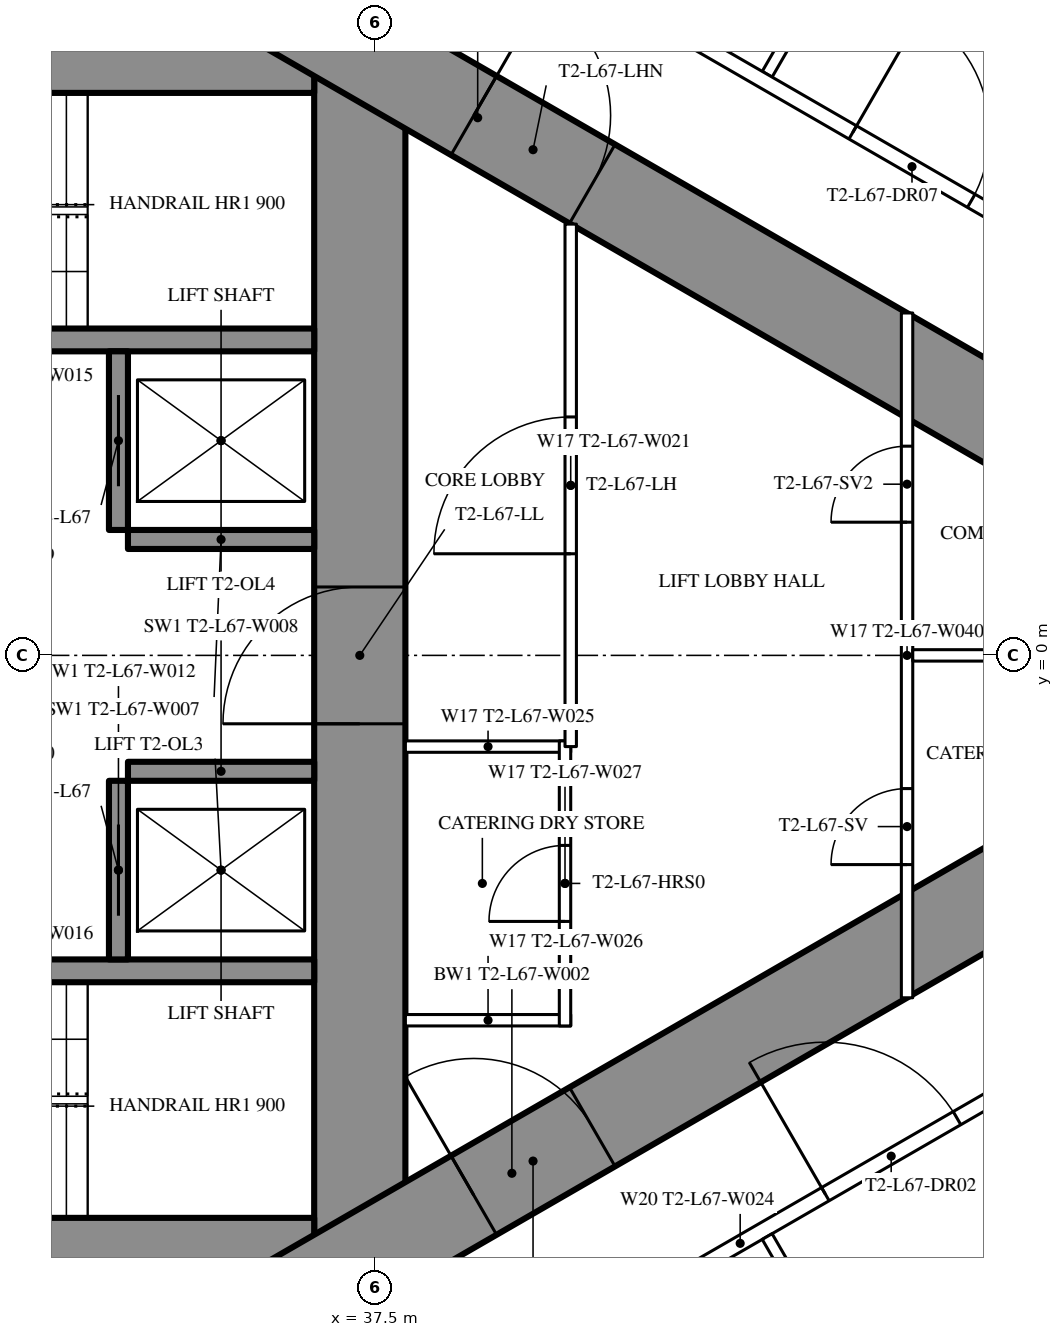
"""IFC4 building model, lengths in metres.
Left out: names, types, materials, properties, quantities, classifications, styles, units other than length and angle.
Written with IfcOpenShell. Run it as: python <this file> out.ifc"""

import sys

from ifc_helpers import new_model, si_unit, direction, frame, frame_2d, origin, place, context, subcontext, project, spatial, rectangle, extrude, element, fill, save


model = new_model("IFC4")
c1 = context("Model", 3, precision=1e-05, world=origin(), true_north=direction((0.0, 1.0)))
c2 = subcontext(c1, "Body", "Model", "MODEL_VIEW")
j1 = project(units=[si_unit("LENGTHUNIT", "METRE"), si_unit("PLANEANGLEUNIT", "RADIAN")], contexts=[c1])
p1 = place(None, origin())
s1 = spatial("IfcSite", under=j1, at=p1, CompositionType="ELEMENT")
p2 = place(p1, origin())
s2 = spatial("IfcBuilding", under=s1, at=p2, CompositionType="ELEMENT")
p3 = place(p2, frame((0.0, 0.0, 251.9)))
s3 = spatial("IfcBuildingStorey", under=s2, at=p3, CompositionType="ELEMENT", Elevation=251.9)
p4 = place(p3, frame((37.3, -8.6, 0.0), z_axis=(0.0, 0.0, 1.0), x_axis=(0.0, 1.0, 0.0)))
e1 = element("IfcWall", 1, at=p4, inside=s3, PredefinedType="SHEAR", context=c2, shape_type="SweptSolid", body=[
    extrude(rectangle(XDim=17.2, YDim=1.2, at=frame_2d((8.6, 0.0))), origin(), (0.0, 0.0, 1.0), 5.4),
])
p5 = place(p4, frame((7.7, 0.0, 0.0)))
e2 = element("IfcOpeningElement", 2, at=p5, cuts=e1, PredefinedType="OPENING", context=c2, shape_type="SweptSolid", body=[
    extrude(rectangle(XDim=1.8, YDim=2.2, at=frame_2d((0.9, 1.1))), frame((0.0, 0.61, 0.0), z_axis=(0.0, -1.0, 0.0), x_axis=(1.0, 0.0, 0.0)), (0.0, 0.0, 1.0), 1.22),
])
p6 = place(p3, frame((28.3, -8.0, 0.0), z_axis=(0.0, 0.0, 1.0), x_axis=(1.0, 0.0, 0.0)))
e3 = element("IfcWall", 3, at=p6, inside=s3, PredefinedType="SHEAR", context=c2, shape_type="SweptSolid", body=[
    extrude(rectangle(XDim=8.4, YDim=1.2, at=frame_2d((4.2, 0.0))), origin(), (0.0, 0.0, 1.0), 5.4),
])
p7 = place(p6, frame((0.25, 0.0, 0.0)))
e4 = element("IfcOpeningElement", 4, at=p7, cuts=e3, PredefinedType="OPENING", context=c2, shape_type="SweptSolid", body=[
    extrude(rectangle(XDim=1.0, YDim=2.2, at=frame_2d((0.5, 1.1))), frame((0.0, 0.61, 0.0), z_axis=(0.0, -1.0, 0.0), x_axis=(1.0, 0.0, 0.0)), (0.0, 0.0, 1.0), 1.22),
])
p8 = place(p3, frame((28.3, 8.0, 0.0), z_axis=(0.0, 0.0, 1.0), x_axis=(1.0, 0.0, 0.0)))
e5 = element("IfcWall", 5, at=p8, inside=s3, PredefinedType="SHEAR", context=c2, shape_type="SweptSolid", body=[
    extrude(rectangle(XDim=8.4, YDim=1.2, at=frame_2d((4.2, 0.0))), origin(), (0.0, 0.0, 1.0), 5.4),
])
p9 = place(p8, frame((0.25, 0.0, 0.0)))
e6 = element("IfcOpeningElement", 6, at=p9, cuts=e5, PredefinedType="OPENING", context=c2, shape_type="SweptSolid", body=[
    extrude(rectangle(XDim=1.0, YDim=2.2, at=frame_2d((0.5, 1.1))), frame((0.0, 0.61, 0.0), z_axis=(0.0, -1.0, 0.0), x_axis=(1.0, 0.0, 0.0)), (0.0, 0.0, 1.0), 1.22),
])
for number, where, z_axis, x_axis in (
    (7, (28.3, -4.15, 0.0), (0.0, 0.0, 1.0), (1.0, 0.0, 0.0)),
    (8, (28.3, 4.15, 0.0), (0.0, 0.0, 1.0), (1.0, 0.0, 0.0)),
):
    element("IfcWall", number, at=place(p3, frame(where, z_axis=z_axis, x_axis=x_axis)), inside=s3, PredefinedType="SHEAR", context=c2, shape_type="SweptSolid", body=[
        extrude(rectangle(XDim=8.4, YDim=0.3, at=frame_2d((4.2, 0.0))), origin(), (0.0, 0.0, 1.0), 5.4),
    ])
p10 = place(p3, frame((34.125, -4.0, 0.0), z_axis=(0.0, 0.0, 1.0), x_axis=(0.0, 1.0, 0.0)))
e9 = element("IfcWall", 9, at=p10, inside=s3, PredefinedType="SHEAR", context=c2, shape_type="SweptSolid", body=[
    extrude(rectangle(XDim=2.35, YDim=0.25, at=frame_2d((1.175, 0.0))), origin(), (0.0, 0.0, 1.0), 5.4),
])
p11 = place(p10, frame((0.575, 0.0, 0.0)))
e10 = element("IfcOpeningElement", 10, at=p11, cuts=e9, PredefinedType="OPENING", context=c2, shape_type="SweptSolid", body=[
    extrude(rectangle(XDim=1.2, YDim=2.2, at=frame_2d((0.6, 1.1))), frame((0.0, 0.135, 0.0), z_axis=(0.0, -1.0, 0.0), x_axis=(1.0, 0.0, 0.0)), (0.0, 0.0, 1.0), 0.27),
])
p12 = place(p3, frame((34.25, -1.525, 0.0), z_axis=(0.0, 0.0, 1.0), x_axis=(1.0, 0.0, 0.0)))
e11 = element("IfcWall", 11, at=p12, inside=s3, PredefinedType="SHEAR", context=c2, shape_type="SweptSolid", body=[
    extrude(rectangle(XDim=2.45, YDim=0.25, at=frame_2d((1.225, 0.0))), origin(), (0.0, 0.0, 1.0), 5.4),
])
p13 = place(p3, frame((34.125, 1.65, 0.0), z_axis=(0.0, 0.0, 1.0), x_axis=(0.0, 1.0, 0.0)))
e12 = element("IfcWall", 12, at=p13, inside=s3, PredefinedType="SHEAR", context=c2, shape_type="SweptSolid", body=[
    extrude(rectangle(XDim=2.35, YDim=0.25, at=frame_2d((1.175, 0.0))), origin(), (0.0, 0.0, 1.0), 5.4),
])
p14 = place(p13, frame((0.575, 0.0, 0.0)))
e13 = element("IfcOpeningElement", 13, at=p14, cuts=e12, PredefinedType="OPENING", context=c2, shape_type="SweptSolid", body=[
    extrude(rectangle(XDim=1.2, YDim=2.2, at=frame_2d((0.6, 1.1))), frame((0.0, 0.135, 0.0), z_axis=(0.0, -1.0, 0.0), x_axis=(1.0, 0.0, 0.0)), (0.0, 0.0, 1.0), 0.27),
])
p15 = place(p3, frame((34.25, 1.525, 0.0), z_axis=(0.0, 0.0, 1.0), x_axis=(1.0, 0.0, 0.0)))
e14 = element("IfcWall", 14, at=p15, inside=s3, PredefinedType="SHEAR", context=c2, shape_type="SweptSolid", body=[
    extrude(rectangle(XDim=2.45, YDim=0.25, at=frame_2d((1.225, 0.0))), origin(), (0.0, 0.0, 1.0), 5.4),
])
p16 = place(p3, frame((27.2, -13.8, 0.0), z_axis=(0.0, 0.0, 1.0), x_axis=(0.866027159892, 0.499996958321, 0.0)))
e15 = element("IfcWall", 15, at=p16, inside=s3, PredefinedType="SHEAR", context=c2, shape_type="SweptSolid", body=[
    extrude(rectangle(XDim=27.947, YDim=1.2, at=frame_2d((13.973, 0.0))), origin(), (0.0, 0.0, 1.0), 5.4),
])
p17 = place(p16, frame((4.6, 0.0, 0.0)))
e16 = element("IfcOpeningElement", 16, at=p17, cuts=e15, PredefinedType="OPENING", context=c2, shape_type="SweptSolid", body=[
    extrude(rectangle(XDim=1.0, YDim=2.2, at=frame_2d((0.5, 1.1))), frame((0.0, 0.61, 0.0), z_axis=(0.0, -1.0, 0.0), x_axis=(1.0, 0.0, 0.0)), (0.0, 0.0, 1.0), 1.22),
])
p18 = place(p16, frame((13.395, 0.0, 0.0)))
e17 = element("IfcOpeningElement", 17, at=p18, cuts=e15, PredefinedType="OPENING", context=c2, shape_type="SweptSolid", body=[
    extrude(rectangle(XDim=1.8, YDim=2.2, at=frame_2d((0.9, 1.1))), frame((0.0, 0.61, 0.0), z_axis=(0.0, -1.0, 0.0), x_axis=(1.0, 0.0, 0.0)), (0.0, 0.0, 1.0), 1.22),
])
p19 = place(p3, frame((27.2, 13.8, 0.0), z_axis=(0.0, 0.0, 1.0), x_axis=(0.866024515034, -0.500001539357, 0.0)))
e18 = element("IfcWall", 18, at=p19, inside=s3, PredefinedType="SHEAR", context=c2, shape_type="SweptSolid", body=[
    extrude(rectangle(XDim=26.907, YDim=1.2, at=frame_2d((13.454, 0.0))), origin(), (0.0, 0.0, 1.0), 5.4),
])
p20 = place(p19, frame((4.6, 0.0, 0.0)))
e19 = element("IfcOpeningElement", 19, at=p20, cuts=e18, PredefinedType="OPENING", context=c2, shape_type="SweptSolid", body=[
    extrude(rectangle(XDim=1.0, YDim=2.2, at=frame_2d((0.5, 1.1))), frame((0.0, 0.61, 0.0), z_axis=(0.0, -1.0, 0.0), x_axis=(1.0, 0.0, 0.0)), (0.0, 0.0, 1.0), 1.22),
])
p21 = place(p19, frame((13.395, 0.0, 0.0)))
e20 = element("IfcOpeningElement", 20, at=p21, cuts=e18, PredefinedType="OPENING", context=c2, shape_type="SweptSolid", body=[
    extrude(rectangle(XDim=1.8, YDim=2.2, at=frame_2d((0.9, 1.1))), frame((0.0, 0.61, 0.0), z_axis=(0.0, -1.0, 0.0), x_axis=(1.0, 0.0, 0.0)), (0.0, 0.0, 1.0), 1.22),
])
p22 = place(p3, frame((28.907, -15.47, 0.0), z_axis=(0.0, 0.0, 1.0), x_axis=(0.866023700353, 0.500002950419, 0.0)))
e21 = element("IfcWall", 21, at=p22, inside=s3, PredefinedType="PARTITIONING", context=c2, shape_type="SweptSolid", body=[
    extrude(rectangle(XDim=30.941, YDim=0.2, at=frame_2d((15.47, 0.0))), origin(), (0.0, 0.0, 1.0), 5.15),
])
p23 = place(p22, frame((7.124, 0.0, 0.0)))
e22 = element("IfcOpeningElement", 22, at=p23, cuts=e21, PredefinedType="OPENING", context=c2, shape_type="SweptSolid", body=[
    extrude(rectangle(XDim=1.8, YDim=2.2, at=frame_2d((0.9, 1.1))), frame((0.0, 0.11, 0.0), z_axis=(0.0, -1.0, 0.0), x_axis=(1.0, 0.0, 0.0)), (0.0, 0.0, 1.0), 0.22),
])
p24 = place(p22, frame((16.765, 0.0, 0.0)))
e23 = element("IfcOpeningElement", 23, at=p24, cuts=e21, PredefinedType="OPENING", context=c2, shape_type="SweptSolid", body=[
    extrude(rectangle(XDim=2.0, YDim=2.4, at=frame_2d((1.0, 1.2))), frame((0.0, 0.11, 0.0), z_axis=(0.0, -1.0, 0.0), x_axis=(1.0, 0.0, 0.0)), (0.0, 0.0, 1.0), 0.22),
])
p25 = place(p22, frame((20.748, 0.0, 0.0)))
e24 = element("IfcOpeningElement", 24, at=p25, cuts=e21, PredefinedType="OPENING", context=c2, shape_type="SweptSolid", body=[
    extrude(rectangle(XDim=1.8, YDim=2.2, at=frame_2d((0.9, 1.1))), frame((0.0, 0.11, 0.0), z_axis=(0.0, -1.0, 0.0), x_axis=(1.0, 0.0, 0.0)), (0.0, 0.0, 1.0), 0.22),
])
p26 = place(p22, frame((26.252, 0.0, 0.0)))
e25 = element("IfcOpeningElement", 25, at=p26, cuts=e21, PredefinedType="OPENING", context=c2, shape_type="SweptSolid", body=[
    extrude(rectangle(XDim=1.8, YDim=2.2, at=frame_2d((0.9, 1.1))), frame((0.0, 0.11, 0.0), z_axis=(0.0, -1.0, 0.0), x_axis=(1.0, 0.0, 0.0)), (0.0, 0.0, 1.0), 0.22),
])
for number, where, z_axis, x_axis in (
    (26, (42.66, -7.646, 0.0), (0.0, 0.0, 1.0), (0.5, -0.866, 0.0)),
    (27, (42.66, 7.646, 0.0), (0.0, 0.0, 1.0), (0.5, 0.866, 0.0)),
):
    element("IfcWall", number, at=place(p3, frame(where, z_axis=z_axis, x_axis=x_axis)), inside=s3, PredefinedType="PARTITIONING", context=c2, shape_type="SweptSolid", body=[
        extrude(rectangle(XDim=6.398, YDim=0.15, at=frame_2d((3.199, 0.0))), origin(), (0.0, 0.0, 1.0), 4.25),
    ])
p27 = place(p3, frame((28.907, 15.47, 0.0), z_axis=(0.0, 0.0, 1.0), x_axis=(0.866026627509, -0.499997880441, 0.0)))
e28 = element("IfcWall", 28, at=p27, inside=s3, PredefinedType="PARTITIONING", context=c2, shape_type="SweptSolid", body=[
    extrude(rectangle(XDim=20.563, YDim=0.2, at=frame_2d((10.282, 0.0))), origin(), (0.0, 0.0, 1.0), 5.15),
])
p28 = place(p27, frame((17.181, 0.0, 0.0)))
e29 = element("IfcOpeningElement", 29, at=p28, cuts=e28, PredefinedType="OPENING", context=c2, shape_type="SweptSolid", body=[
    extrude(rectangle(XDim=1.8, YDim=2.2, at=frame_2d((0.9, 1.1))), frame((0.0, 0.11, 0.0), z_axis=(0.0, -1.0, 0.0), x_axis=(1.0, 0.0, 0.0)), (0.0, 0.0, 1.0), 0.22),
])
p29 = place(p27, frame((7.024, 0.0, 0.0)))
e30 = element("IfcOpeningElement", 30, at=p29, cuts=e28, PredefinedType="OPENING", context=c2, shape_type="SweptSolid", body=[
    extrude(rectangle(XDim=2.0, YDim=2.4, at=frame_2d((1.0, 1.2))), frame((0.0, 0.11, 0.0), z_axis=(0.0, -1.0, 0.0), x_axis=(1.0, 0.0, 0.0)), (0.0, 0.0, 1.0), 0.22),
])
for number, where, z_axis, x_axis in (
    (31, (37.9, -1.2, 0.0), (0.0, 0.0, 1.0), (1.0, 0.0, 0.0)),
    (32, (37.9, -4.8, 0.0), (0.0, 0.0, 1.0), (1.0, 0.0, 0.0)),
):
    element("IfcWall", number, at=place(p3, frame(where, z_axis=z_axis, x_axis=x_axis)), inside=s3, PredefinedType="PARTITIONING", context=c2, shape_type="SweptSolid", body=[
        extrude(rectangle(XDim=2.175, YDim=0.15, at=frame_2d((1.087, 0.0))), origin(), (0.0, 0.0, 1.0), 5.15),
    ])
p30 = place(p3, frame((40.0, -4.875, 0.0), z_axis=(0.0, 0.0, 1.0), x_axis=(0.0, 1.0, 0.0)))
e33 = element("IfcWall", 33, at=p30, inside=s3, PredefinedType="PARTITIONING", context=c2, shape_type="SweptSolid", body=[
    extrude(rectangle(XDim=3.75, YDim=0.15, at=frame_2d((1.875, 0.0))), origin(), (0.0, 0.0, 1.0), 5.15),
])
p31 = place(p30, frame((1.375, 0.0, 0.0)))
e34 = element("IfcOpeningElement", 34, at=p31, cuts=e33, PredefinedType="OPENING", context=c2, shape_type="SweptSolid", body=[
    extrude(rectangle(XDim=1.0, YDim=2.2, at=frame_2d((0.5, 1.1))), frame((0.0, 0.085, 0.0), z_axis=(0.0, -1.0, 0.0), x_axis=(1.0, 0.0, 0.0)), (0.0, 0.0, 1.0), 0.17),
])
p32 = place(p3, frame((40.075, -1.2, 0.0), z_axis=(0.0, 0.0, 1.0), x_axis=(0.0, 1.0, 0.0)))
e35 = element("IfcWall", 35, at=p32, inside=s3, PredefinedType="PARTITIONING", context=c2, shape_type="SweptSolid", body=[
    extrude(rectangle(XDim=6.874, YDim=0.15, at=frame_2d((3.437, 0.0))), origin(), (0.0, 0.0, 1.0), 5.15),
])
p33 = place(p32, frame((2.537, 0.0, 0.0)))
e36 = element("IfcOpeningElement", 36, at=p33, cuts=e35, PredefinedType="OPENING", context=c2, shape_type="SweptSolid", body=[
    extrude(rectangle(XDim=1.8, YDim=2.2, at=frame_2d((0.9, 1.1))), frame((0.0, 0.085, 0.0), z_axis=(0.0, -1.0, 0.0), x_axis=(1.0, 0.0, 0.0)), (0.0, 0.0, 1.0), 0.17),
])
p34 = place(p3, frame((44.5, -4.505, 0.0), z_axis=(0.0, 0.0, 1.0), x_axis=(0.0, 1.0, 0.0)))
e37 = element("IfcWall", 37, at=p34, inside=s3, PredefinedType="PARTITIONING", context=c2, shape_type="SweptSolid", body=[
    extrude(rectangle(XDim=9.009, YDim=0.15, at=frame_2d((4.505, 0.0))), origin(), (0.0, 0.0, 1.0), 5.15),
])
p35 = place(p34, frame((1.752, 0.0, 0.0)))
e38 = element("IfcOpeningElement", 38, at=p35, cuts=e37, PredefinedType="OPENING", context=c2, shape_type="SweptSolid", body=[
    extrude(rectangle(XDim=1.0, YDim=2.2, at=frame_2d((0.5, 1.1))), frame((0.0, 0.085, 0.0), z_axis=(0.0, -1.0, 0.0), x_axis=(1.0, 0.0, 0.0)), (0.0, 0.0, 1.0), 0.17),
])
p36 = place(p34, frame((6.257, 0.0, 0.0)))
e39 = element("IfcOpeningElement", 39, at=p36, cuts=e37, PredefinedType="OPENING", context=c2, shape_type="SweptSolid", body=[
    extrude(rectangle(XDim=1.0, YDim=2.2, at=frame_2d((0.5, 1.1))), frame((0.0, 0.085, 0.0), z_axis=(0.0, -1.0, 0.0), x_axis=(1.0, 0.0, 0.0)), (0.0, 0.0, 1.0), 0.17),
])
p37 = place(p3, frame((44.575, 0.0, 0.0), z_axis=(0.0, 0.0, 1.0), x_axis=(1.0, 0.0, 0.0)))
e40 = element("IfcWall", 40, at=p37, inside=s3, PredefinedType="PARTITIONING", context=c2, shape_type="SweptSolid", body=[
    extrude(rectangle(XDim=7.727, YDim=0.15, at=frame_2d((3.864, 0.0))), origin(), (0.0, 0.0, 1.0), 4.25),
])
p38 = place(p24, origin())
e41 = element("IfcDoor", 41, at=p38, inside=s3, OperationType="DOUBLE_DOOR_SINGLE_SWING", PredefinedType="DOOR", context=c2, shape_type="SweptSolid", body=[
    extrude(rectangle(XDim=2.0, YDim=2.4, at=frame_2d((1.0, 1.2))), frame((0.0, 0.025, 0.0), z_axis=(0.0, -1.0, 0.0), x_axis=(1.0, 0.0, 0.0)), (0.0, 0.0, 1.0), 0.05),
])
fill(e23, e41)
p39 = place(p28, origin())
e42 = element("IfcDoor", 42, at=p39, inside=s3, OperationType="DOUBLE_DOOR_SINGLE_SWING", PredefinedType="DOOR", context=c2, shape_type="SweptSolid", body=[
    extrude(rectangle(XDim=1.8, YDim=2.2, at=frame_2d((0.9, 1.1))), frame((0.0, 0.025, 0.0), z_axis=(0.0, -1.0, 0.0), x_axis=(1.0, 0.0, 0.0)), (0.0, 0.0, 1.0), 0.05),
])
fill(e29, e42)
p40 = place(p31, origin())
e43 = element("IfcDoor", 43, at=p40, inside=s3, OperationType="SINGLE_SWING_LEFT", PredefinedType="DOOR", context=c2, shape_type="SweptSolid", body=[
    extrude(rectangle(XDim=1.0, YDim=2.2, at=frame_2d((0.5, 1.1))), frame((0.0, 0.025, 0.0), z_axis=(0.0, -1.0, 0.0), x_axis=(1.0, 0.0, 0.0)), (0.0, 0.0, 1.0), 0.05),
])
fill(e34, e43)
p41 = place(p33, origin())
e44 = element("IfcDoor", 44, at=p41, inside=s3, OperationType="DOUBLE_DOOR_SINGLE_SWING", PredefinedType="DOOR", context=c2, shape_type="SweptSolid", body=[
    extrude(rectangle(XDim=1.8, YDim=2.2, at=frame_2d((0.9, 1.1))), frame((0.0, 0.025, 0.0), z_axis=(0.0, -1.0, 0.0), x_axis=(1.0, 0.0, 0.0)), (0.0, 0.0, 1.0), 0.05),
])
fill(e36, e44)
p42 = place(p35, origin())
e45 = element("IfcDoor", 45, at=p42, inside=s3, OperationType="SINGLE_SWING_LEFT", PredefinedType="DOOR", context=c2, shape_type="SweptSolid", body=[
    extrude(rectangle(XDim=1.0, YDim=2.2, at=frame_2d((0.5, 1.1))), frame((0.0, 0.025, 0.0), z_axis=(0.0, -1.0, 0.0), x_axis=(1.0, 0.0, 0.0)), (0.0, 0.0, 1.0), 0.05),
])
fill(e38, e45)
p43 = place(p36, origin())
e46 = element("IfcDoor", 46, at=p43, inside=s3, OperationType="SINGLE_SWING_LEFT", PredefinedType="DOOR", context=c2, shape_type="SweptSolid", body=[
    extrude(rectangle(XDim=1.0, YDim=2.2, at=frame_2d((0.5, 1.1))), frame((0.0, 0.025, 0.0), z_axis=(0.0, -1.0, 0.0), x_axis=(1.0, 0.0, 0.0)), (0.0, 0.0, 1.0), 0.05),
])
fill(e39, e46)
p44 = place(p18, origin())
e47 = element("IfcDoor", 47, at=p44, inside=s3, OperationType="DOUBLE_DOOR_SINGLE_SWING", PredefinedType="DOOR", context=c2, shape_type="SweptSolid", body=[
    extrude(rectangle(XDim=1.8, YDim=2.2, at=frame_2d((0.9, 1.1))), frame((0.0, 0.025, 0.0), z_axis=(0.0, -1.0, 0.0), x_axis=(1.0, 0.0, 0.0)), (0.0, 0.0, 1.0), 0.05),
])
fill(e17, e47)
p45 = place(p21, origin())
e48 = element("IfcDoor", 48, at=p45, inside=s3, OperationType="DOUBLE_DOOR_SINGLE_SWING", PredefinedType="DOOR", context=c2, shape_type="SweptSolid", body=[
    extrude(rectangle(XDim=1.8, YDim=2.2, at=frame_2d((0.9, 1.1))), frame((0.0, 0.025, 0.0), z_axis=(0.0, -1.0, 0.0), x_axis=(1.0, 0.0, 0.0)), (0.0, 0.0, 1.0), 0.05),
])
fill(e20, e48)
p46 = place(p5, origin())
e49 = element("IfcDoor", 49, at=p46, inside=s3, OperationType="DOUBLE_DOOR_SINGLE_SWING", PredefinedType="DOOR", context=c2, shape_type="SweptSolid", body=[
    extrude(rectangle(XDim=1.8, YDim=2.2, at=frame_2d((0.9, 1.1))), frame((0.0, 0.025, 0.0), z_axis=(0.0, -1.0, 0.0), x_axis=(1.0, 0.0, 0.0)), (0.0, 0.0, 1.0), 0.05),
])
fill(e2, e49)
p47 = place(p11, origin())
e50 = element("IfcDoor", 50, at=p47, inside=s3, OperationType="DOUBLE_DOOR_SLIDING", PredefinedType="USERDEFINED", context=c2, shape_type="SweptSolid", body=[
    extrude(rectangle(XDim=1.2, YDim=2.2, at=frame_2d((0.6, 1.1))), frame((0.0, 0.025, 0.0), z_axis=(0.0, -1.0, 0.0), x_axis=(1.0, 0.0, 0.0)), (0.0, 0.0, 1.0), 0.05),
])
fill(e10, e50)
p48 = place(p14, origin())
e51 = element("IfcDoor", 51, at=p48, inside=s3, OperationType="DOUBLE_DOOR_SLIDING", PredefinedType="USERDEFINED", context=c2, shape_type="SweptSolid", body=[
    extrude(rectangle(XDim=1.2, YDim=2.2, at=frame_2d((0.6, 1.1))), frame((0.0, 0.025, 0.0), z_axis=(0.0, -1.0, 0.0), x_axis=(1.0, 0.0, 0.0)), (0.0, 0.0, 1.0), 0.05),
])
fill(e13, e51)
save(model, sys.argv[1])
